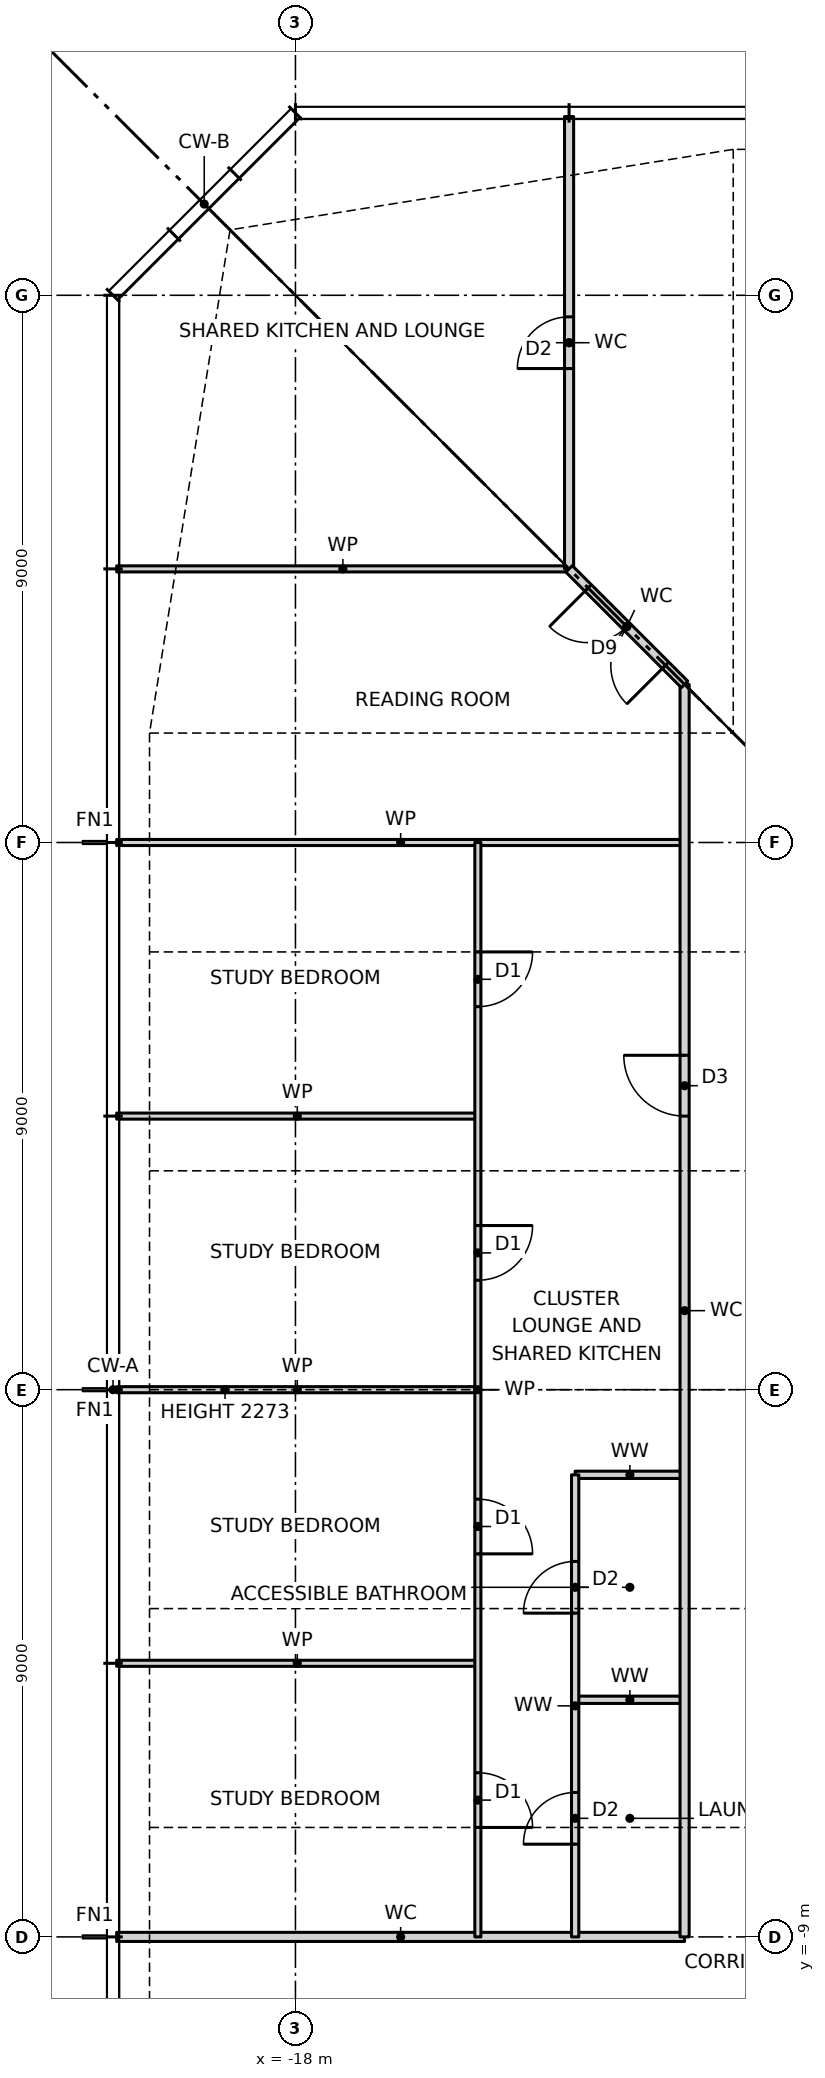
"""IFC4 building model, lengths in metres.
Left out: names, types, materials, properties, quantities, classifications, styles, units other than length and angle.
Written with IfcOpenShell. Run it as: python <this file> out.ifc"""

import sys

from ifc_helpers import new_model, si_unit, direction, frame, frame_2d, origin, place, context, subcontext, project, spatial, rectangle, extrude, element, fill, save


model = new_model("IFC4")
c1 = context("Model", 3, precision=1e-05, world=origin(), true_north=direction((0.0, 1.0)))
c2 = subcontext(c1, "Body", "Model", "MODEL_VIEW")
j1 = project(units=[si_unit("LENGTHUNIT", "METRE"), si_unit("PLANEANGLEUNIT", "RADIAN")], contexts=[c1])
p1 = place(None, origin())
s1 = spatial("IfcSite", under=j1, at=p1, CompositionType="ELEMENT")
p2 = place(p1, origin())
s2 = spatial("IfcBuilding", under=s1, at=p2, CompositionType="ELEMENT")
p3 = place(p2, frame((0.0, 0.0, 140.0)))
s3 = spatial("IfcBuildingStorey", under=s2, at=p3, CompositionType="ELEMENT", Elevation=140.0)
p4 = place(p3, frame((-20.94, -9.0, 0.0), z_axis=(0.0, 0.0, 1.0), x_axis=(1.0, 0.0, 0.0)))
e1 = element("IfcWall", 1, at=p4, inside=s3, PredefinedType="PARTITIONING", context=c2, shape_type="SweptSolid", body=[
    extrude(rectangle(XDim=9.34, YDim=0.15, at=frame_2d((4.67, 0.0))), origin(), (0.0, 0.0, 1.0), 3.2),
])
p5 = place(p3, frame((-13.4, -5.1, 0.0), z_axis=(0.0, 0.0, 1.0), x_axis=(1.0, 0.0, 0.0)))
e2 = element("IfcWall", 2, at=p5, inside=s3, PredefinedType="PARTITIONING", context=c2, shape_type="SweptSolid", body=[
    extrude(rectangle(XDim=1.8, YDim=0.12, at=frame_2d((0.9, 0.0))), origin(), (0.0, 0.0, 1.0), 3.2),
])
p6 = place(p3, frame((-20.94, -4.5, 0.0), z_axis=(0.0, 0.0, 1.0), x_axis=(1.0, 0.0, 0.0)))
e3 = element("IfcWall", 3, at=p6, inside=s3, PredefinedType="PARTITIONING", context=c2, shape_type="SweptSolid", body=[
    extrude(rectangle(XDim=5.94, YDim=0.1, at=frame_2d((2.97, 0.0))), origin(), (0.0, 0.0, 1.0), 3.2),
])
p7 = place(p3, frame((-13.4, -1.4, 0.0), z_axis=(0.0, 0.0, 1.0), x_axis=(1.0, 0.0, 0.0)))
e4 = element("IfcWall", 4, at=p7, inside=s3, PredefinedType="PARTITIONING", context=c2, shape_type="SweptSolid", body=[
    extrude(rectangle(XDim=1.8, YDim=0.12, at=frame_2d((0.9, 0.0))), origin(), (0.0, 0.0, 1.0), 3.2),
])
p8 = place(p3, frame((-20.94, 0.0, 0.0), z_axis=(0.0, 0.0, 1.0), x_axis=(1.0, 0.0, 0.0)))
e5 = element("IfcWall", 5, at=p8, inside=s3, PredefinedType="PARTITIONING", context=c2, shape_type="SweptSolid", body=[
    extrude(rectangle(XDim=5.94, YDim=0.1, at=frame_2d((2.97, 0.0))), origin(), (0.0, 0.0, 1.0), 2.273),
])
p9 = place(p3, frame((-20.94, 4.5, 0.0), z_axis=(0.0, 0.0, 1.0), x_axis=(1.0, 0.0, 0.0)))
e6 = element("IfcWall", 6, at=p9, inside=s3, PredefinedType="PARTITIONING", context=c2, shape_type="SweptSolid", body=[
    extrude(rectangle(XDim=5.94, YDim=0.1, at=frame_2d((2.97, 0.0))), origin(), (0.0, 0.0, 1.0), 3.2),
])
p10 = place(p3, frame((-20.94, 9.0, 0.0), z_axis=(0.0, 0.0, 1.0), x_axis=(1.0, 0.0, 0.0)))
e7 = element("IfcWall", 7, at=p10, inside=s3, PredefinedType="PARTITIONING", context=c2, shape_type="SweptSolid", body=[
    extrude(rectangle(XDim=9.34, YDim=0.1, at=frame_2d((4.67, 0.0))), origin(), (0.0, 0.0, 1.0), 3.2),
])
p11 = place(p3, frame((-20.94, 13.5, 0.0), z_axis=(0.0, 0.0, 1.0), x_axis=(1.0, 0.0, 0.0)))
e8 = element("IfcWall", 8, at=p11, inside=s3, PredefinedType="PARTITIONING", context=c2, shape_type="SweptSolid", body=[
    extrude(rectangle(XDim=7.44, YDim=0.1, at=frame_2d((3.72, 0.0))), origin(), (0.0, 0.0, 1.0), 3.2),
])
p12 = place(p3, frame((-11.6, -9.0, 0.0), z_axis=(0.0, 0.0, 1.0), x_axis=(0.0, 1.0, 0.0)))
e9 = element("IfcWall", 9, at=p12, inside=s3, PredefinedType="PARTITIONING", context=c2, shape_type="SweptSolid", body=[
    extrude(rectangle(XDim=20.6, YDim=0.15, at=frame_2d((10.3, 0.0))), origin(), (0.0, 0.0, 1.0), 3.2),
])
p13 = place(p12, frame((13.5, 0.0, 0.0)))
e10 = element("IfcOpeningElement", 10, at=p13, cuts=e9, PredefinedType="OPENING", context=c2, shape_type="SweptSolid", body=[
    extrude(rectangle(XDim=1.0, YDim=2.1, at=frame_2d((0.5, 1.05))), frame((0.0, 0.085, 0.0), z_axis=(0.0, -1.0, 0.0), x_axis=(1.0, 0.0, 0.0)), (0.0, 0.0, 1.0), 0.17),
])
p14 = place(p3, frame((-13.4, -9.0, 0.0), z_axis=(0.0, 0.0, 1.0), x_axis=(0.0, 1.0, 0.0)))
e11 = element("IfcWall", 11, at=p14, inside=s3, PredefinedType="PARTITIONING", context=c2, shape_type="SweptSolid", body=[
    extrude(rectangle(XDim=7.6, YDim=0.12, at=frame_2d((3.8, 0.0))), origin(), (0.0, 0.0, 1.0), 3.2),
])
p15 = place(p14, frame((5.325, 0.0, 0.0)))
e12 = element("IfcOpeningElement", 12, at=p15, cuts=e11, PredefinedType="OPENING", context=c2, shape_type="SweptSolid", body=[
    extrude(rectangle(XDim=0.85, YDim=2.1, at=frame_2d((0.425, 1.05))), frame((0.0, 0.07, 0.0), z_axis=(0.0, -1.0, 0.0), x_axis=(1.0, 0.0, 0.0)), (0.0, 0.0, 1.0), 0.14),
])
p16 = place(p14, frame((1.525, 0.0, 0.0)))
e13 = element("IfcOpeningElement", 13, at=p16, cuts=e11, PredefinedType="OPENING", context=c2, shape_type="SweptSolid", body=[
    extrude(rectangle(XDim=0.85, YDim=2.1, at=frame_2d((0.425, 1.05))), frame((0.0, 0.07, 0.0), z_axis=(0.0, -1.0, 0.0), x_axis=(1.0, 0.0, 0.0)), (0.0, 0.0, 1.0), 0.14),
])
p17 = place(p3, frame((-13.5, 13.5, 0.0), z_axis=(0.0, 0.0, 1.0), x_axis=(0.0, 1.0, 0.0)))
e14 = element("IfcWall", 14, at=p17, inside=s3, PredefinedType="PARTITIONING", context=c2, shape_type="SweptSolid", body=[
    extrude(rectangle(XDim=7.44, YDim=0.15, at=frame_2d((3.72, 0.0))), origin(), (0.0, 0.0, 1.0), 3.2),
])
p18 = place(p17, frame((3.295, 0.0, 0.0)))
e15 = element("IfcOpeningElement", 15, at=p18, cuts=e14, PredefinedType="OPENING", context=c2, shape_type="SweptSolid", body=[
    extrude(rectangle(XDim=0.85, YDim=2.1, at=frame_2d((0.425, 1.05))), frame((0.0, 0.085, 0.0), z_axis=(0.0, -1.0, 0.0), x_axis=(1.0, 0.0, 0.0)), (0.0, 0.0, 1.0), 0.17),
])
p19 = place(p3, frame((-15.0, -9.0, 0.0), z_axis=(0.0, 0.0, 1.0), x_axis=(0.0, 1.0, 0.0)))
e16 = element("IfcWall", 16, at=p19, inside=s3, PredefinedType="PARTITIONING", context=c2, shape_type="SweptSolid", body=[
    extrude(rectangle(XDim=18.0, YDim=0.1, at=frame_2d((9.0, 0.0))), origin(), (0.0, 0.0, 1.0), 3.2),
])
p20 = place(p19, frame((15.3, 0.0, 0.0)))
e17 = element("IfcOpeningElement", 17, at=p20, cuts=e16, PredefinedType="OPENING", context=c2, shape_type="SweptSolid", body=[
    extrude(rectangle(XDim=0.9, YDim=2.1, at=frame_2d((0.45, 1.05))), frame((0.0, 0.06, 0.0), z_axis=(0.0, -1.0, 0.0), x_axis=(1.0, 0.0, 0.0)), (0.0, 0.0, 1.0), 0.12),
])
p21 = place(p19, frame((10.8, 0.0, 0.0)))
e18 = element("IfcOpeningElement", 18, at=p21, cuts=e16, PredefinedType="OPENING", context=c2, shape_type="SweptSolid", body=[
    extrude(rectangle(XDim=0.9, YDim=2.1, at=frame_2d((0.45, 1.05))), frame((0.0, 0.06, 0.0), z_axis=(0.0, -1.0, 0.0), x_axis=(1.0, 0.0, 0.0)), (0.0, 0.0, 1.0), 0.12),
])
p22 = place(p19, frame((6.3, 0.0, 0.0)))
e19 = element("IfcOpeningElement", 19, at=p22, cuts=e16, PredefinedType="OPENING", context=c2, shape_type="SweptSolid", body=[
    extrude(rectangle(XDim=0.9, YDim=2.1, at=frame_2d((0.45, 1.05))), frame((0.0, 0.06, 0.0), z_axis=(0.0, -1.0, 0.0), x_axis=(1.0, 0.0, 0.0)), (0.0, 0.0, 1.0), 0.12),
])
p23 = place(p19, frame((1.8, 0.0, 0.0)))
e20 = element("IfcOpeningElement", 20, at=p23, cuts=e16, PredefinedType="OPENING", context=c2, shape_type="SweptSolid", body=[
    extrude(rectangle(XDim=0.9, YDim=2.1, at=frame_2d((0.45, 1.05))), frame((0.0, 0.06, 0.0), z_axis=(0.0, -1.0, 0.0), x_axis=(1.0, 0.0, 0.0)), (0.0, 0.0, 1.0), 0.12),
])
p24 = place(p3, frame((-11.6, 11.6, 0.0), z_axis=(0.0, 0.0, 1.0), x_axis=(-0.707106781187, 0.707106781187, 0.0)))
e21 = element("IfcWall", 21, at=p24, inside=s3, PredefinedType="PARTITIONING", context=c2, shape_type="SweptSolid", body=[
    extrude(rectangle(XDim=2.687, YDim=0.15, at=frame_2d((1.343, 0.0))), origin(), (0.0, 0.0, 1.0), 3.2),
])
p25 = place(p24, frame((0.444, 0.0, 0.0)))
e22 = element("IfcOpeningElement", 22, at=p25, cuts=e21, PredefinedType="OPENING", context=c2, shape_type="SweptSolid", body=[
    extrude(rectangle(XDim=1.8, YDim=2.1, at=frame_2d((0.9, 1.05))), frame((0.0, 0.085, 0.0), z_axis=(0.0, -1.0, 0.0), x_axis=(1.0, 0.0, 0.0)), (0.0, 0.0, 1.0), 0.17),
])
p26 = place(p25, origin())
e23 = element("IfcDoor", 23, at=p26, inside=s3, OperationType="DOUBLE_DOOR_SINGLE_SWING", PredefinedType="DOOR", context=c2, shape_type="SweptSolid", body=[
    extrude(rectangle(XDim=1.8, YDim=2.1, at=frame_2d((0.9, 1.05))), frame((0.0, 0.025, 0.0), z_axis=(0.0, -1.0, 0.0), x_axis=(1.0, 0.0, 0.0)), (0.0, 0.0, 1.0), 0.05),
])
fill(e22, e23)
p27 = place(p20, frame((0.9, 0.0, 0.0), z_axis=(0.0, 0.0, 1.0), x_axis=(-1.0, 0.0, 0.0)))
e24 = element("IfcDoor", 24, at=p27, inside=s3, OperationType="SINGLE_SWING_LEFT", PredefinedType="DOOR", context=c2, shape_type="SweptSolid", body=[
    extrude(rectangle(XDim=0.9, YDim=2.1, at=frame_2d((0.45, 1.05))), frame((0.0, 0.025, 0.0), z_axis=(0.0, -1.0, 0.0), x_axis=(1.0, 0.0, 0.0)), (0.0, 0.0, 1.0), 0.05),
])
fill(e17, e24)
p28 = place(p21, frame((0.9, 0.0, 0.0), z_axis=(0.0, 0.0, 1.0), x_axis=(-1.0, 0.0, 0.0)))
e25 = element("IfcDoor", 25, at=p28, inside=s3, OperationType="SINGLE_SWING_LEFT", PredefinedType="DOOR", context=c2, shape_type="SweptSolid", body=[
    extrude(rectangle(XDim=0.9, YDim=2.1, at=frame_2d((0.45, 1.05))), frame((0.0, 0.025, 0.0), z_axis=(0.0, -1.0, 0.0), x_axis=(1.0, 0.0, 0.0)), (0.0, 0.0, 1.0), 0.05),
])
fill(e18, e25)
p29 = place(p22, frame((0.9, 0.0, 0.0), z_axis=(0.0, 0.0, 1.0), x_axis=(-1.0, 0.0, 0.0)))
e26 = element("IfcDoor", 26, at=p29, inside=s3, OperationType="SINGLE_SWING_RIGHT", PredefinedType="DOOR", context=c2, shape_type="SweptSolid", body=[
    extrude(rectangle(XDim=0.9, YDim=2.1, at=frame_2d((0.45, 1.05))), frame((0.0, 0.025, 0.0), z_axis=(0.0, -1.0, 0.0), x_axis=(1.0, 0.0, 0.0)), (0.0, 0.0, 1.0), 0.05),
])
fill(e19, e26)
p30 = place(p23, frame((0.9, 0.0, 0.0), z_axis=(0.0, 0.0, 1.0), x_axis=(-1.0, 0.0, 0.0)))
e27 = element("IfcDoor", 27, at=p30, inside=s3, OperationType="SINGLE_SWING_RIGHT", PredefinedType="DOOR", context=c2, shape_type="SweptSolid", body=[
    extrude(rectangle(XDim=0.9, YDim=2.1, at=frame_2d((0.45, 1.05))), frame((0.0, 0.025, 0.0), z_axis=(0.0, -1.0, 0.0), x_axis=(1.0, 0.0, 0.0)), (0.0, 0.0, 1.0), 0.05),
])
fill(e20, e27)
p31 = place(p13, origin())
e28 = element("IfcDoor", 28, at=p31, inside=s3, OperationType="SINGLE_SWING_RIGHT", PredefinedType="DOOR", context=c2, shape_type="SweptSolid", body=[
    extrude(rectangle(XDim=1.0, YDim=2.1, at=frame_2d((0.5, 1.05))), frame((0.0, 0.025, 0.0), z_axis=(0.0, -1.0, 0.0), x_axis=(1.0, 0.0, 0.0)), (0.0, 0.0, 1.0), 0.05),
])
fill(e10, e28)
p32 = place(p15, origin())
e29 = element("IfcDoor", 29, at=p32, inside=s3, OperationType="SINGLE_SWING_LEFT", PredefinedType="DOOR", context=c2, shape_type="SweptSolid", body=[
    extrude(rectangle(XDim=0.85, YDim=2.1, at=frame_2d((0.425, 1.05))), frame((0.0, 0.025, 0.0), z_axis=(0.0, -1.0, 0.0), x_axis=(1.0, 0.0, 0.0)), (0.0, 0.0, 1.0), 0.05),
])
fill(e12, e29)
p33 = place(p16, origin())
e30 = element("IfcDoor", 30, at=p33, inside=s3, OperationType="SINGLE_SWING_LEFT", PredefinedType="DOOR", context=c2, shape_type="SweptSolid", body=[
    extrude(rectangle(XDim=0.85, YDim=2.1, at=frame_2d((0.425, 1.05))), frame((0.0, 0.025, 0.0), z_axis=(0.0, -1.0, 0.0), x_axis=(1.0, 0.0, 0.0)), (0.0, 0.0, 1.0), 0.05),
])
fill(e13, e30)
p34 = place(p18, origin())
e31 = element("IfcDoor", 31, at=p34, inside=s3, OperationType="SINGLE_SWING_LEFT", PredefinedType="DOOR", context=c2, shape_type="SweptSolid", body=[
    extrude(rectangle(XDim=0.85, YDim=2.1, at=frame_2d((0.425, 1.05))), frame((0.0, 0.025, 0.0), z_axis=(0.0, -1.0, 0.0), x_axis=(1.0, 0.0, 0.0)), (0.0, 0.0, 1.0), 0.05),
])
fill(e15, e31)
save(model, sys.argv[1])
